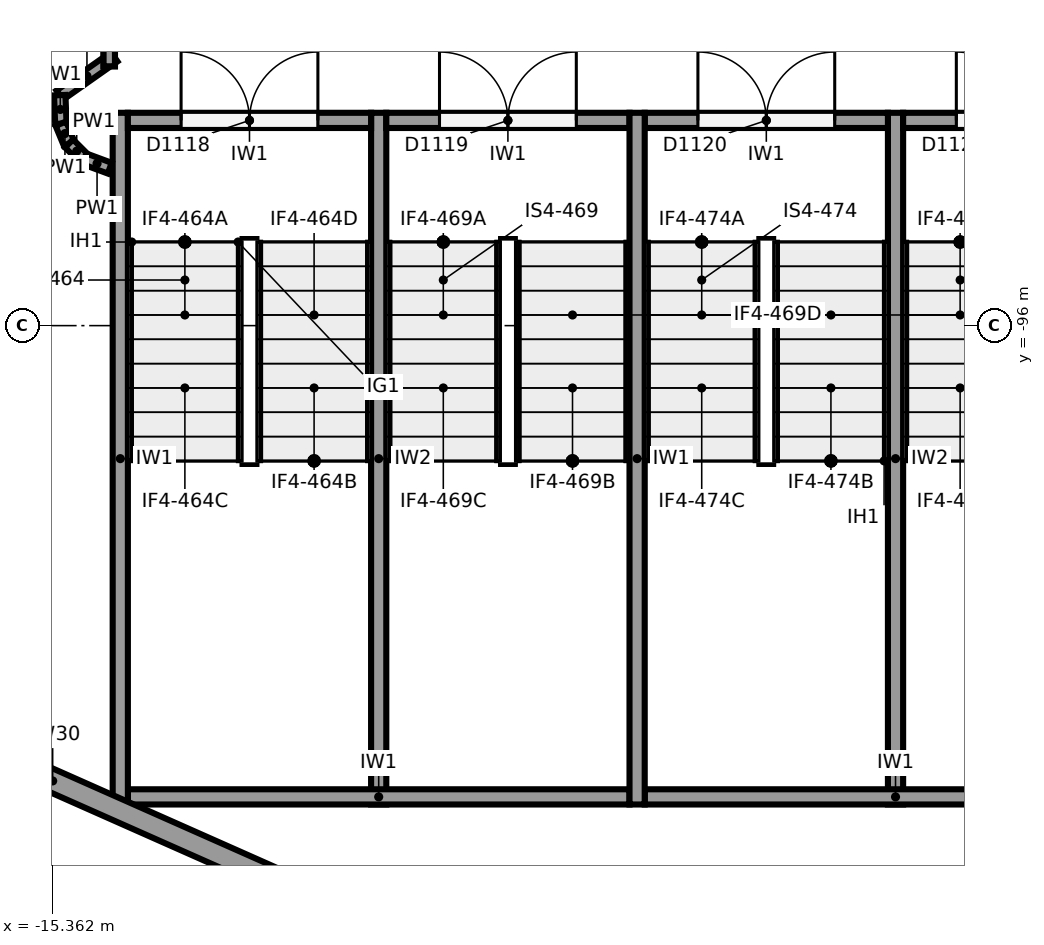
"""IFC4 building model, lengths in metres.
Left out: names, types, materials, properties, quantities, classifications, styles, units other than length and angle.
Written with IfcOpenShell. Run it as: python <this file> out.ifc"""

import sys

from ifc_helpers import new_model, si_unit, direction, frame, frame_2d, origin, place, context, subcontext, project, spatial, rectangle, extrude, element, fill, save


model = new_model("IFC4")
c1 = context("Model", 3, precision=1e-05, world=origin(), true_north=direction((0.0, 1.0)))
c2 = subcontext(c1, "Body", "Model", "MODEL_VIEW")
j1 = project(units=[si_unit("LENGTHUNIT", "METRE"), si_unit("PLANEANGLEUNIT", "RADIAN")], contexts=[c1])
p1 = place(None, origin())
s1 = spatial("IfcSite", under=j1, at=p1, CompositionType="ELEMENT")
p2 = place(p1, origin())
s2 = spatial("IfcBuilding", under=s1, at=p2, CompositionType="ELEMENT")
p3 = place(p2, frame((0.0, 0.0, 12.0)))
s3 = spatial("IfcBuildingStorey", under=s2, at=p3, CompositionType="ELEMENT", Elevation=12.0)
p4 = place(p3, frame((-8.123, -105.198, 0.0), z_axis=(0.0, 0.0, 1.0), x_axis=(-0.914138897099, 0.405401130748, 0.0)))
e1 = element("IfcWall", 1, at=p4, inside=s3, PredefinedType="SOLIDWALL", context=c2, shape_type="SweptSolid", body=[
    extrude(rectangle(XDim=15.824, YDim=0.3, at=frame_2d((7.912, 0.0))), origin(), (0.0, 0.0, 1.0), 4.35),
])
p5 = place(p4, frame((11.574, 0.0, 0.0)))
e2 = element("IfcOpeningElement", 2, at=p5, cuts=e1, PredefinedType="OPENING", context=c2, shape_type="SweptSolid", body=[
    extrude(rectangle(XDim=1.8, YDim=2.4, at=frame_2d((0.9, 1.2))), frame((0.0, 0.16, 0.0), z_axis=(0.0, -1.0, 0.0), x_axis=(1.0, 0.0, 0.0)), (0.0, 0.0, 1.0), 0.32),
])
p6 = place(p3, frame((7.256, -98.782, 0.0), z_axis=(0.0, 0.0, 1.0), x_axis=(-0.914136361455, -0.405406848322, 0.0)))
e3 = element("IfcWall", 3, at=p6, inside=s3, PredefinedType="SOLIDWALL", context=c2, shape_type="SweptSolid", body=[
    extrude(rectangle(XDim=15.824, YDim=0.35, at=frame_2d((7.912, 0.0))), origin(), (0.0, 0.0, 1.0), 4.35),
])
p7 = place(p6, frame((0.75, 0.0, 1.0)))
e4 = element("IfcOpeningElement", 4, at=p7, cuts=e3, PredefinedType="OPENING", context=c2, shape_type="SweptSolid", body=[
    extrude(rectangle(XDim=0.9, YDim=3.25, at=frame_2d((0.45, 1.625))), frame((0.0, 0.185, 0.0), z_axis=(0.0, -1.0, 0.0), x_axis=(1.0, 0.0, 0.0)), (0.0, 0.0, 1.0), 0.37),
])
p8 = place(p6, frame((2.85, 0.0, 1.0)))
e5 = element("IfcOpeningElement", 5, at=p8, cuts=e3, PredefinedType="OPENING", context=c2, shape_type="SweptSolid", body=[
    extrude(rectangle(XDim=0.9, YDim=3.25, at=frame_2d((0.45, 1.625))), frame((0.0, 0.185, 0.0), z_axis=(0.0, -1.0, 0.0), x_axis=(1.0, 0.0, 0.0)), (0.0, 0.0, 1.0), 0.37),
])
p9 = place(p6, frame((4.95, 0.0, 1.0)))
e6 = element("IfcOpeningElement", 6, at=p9, cuts=e3, PredefinedType="OPENING", context=c2, shape_type="SweptSolid", body=[
    extrude(rectangle(XDim=0.9, YDim=3.25, at=frame_2d((0.45, 1.625))), frame((0.0, 0.185, 0.0), z_axis=(0.0, -1.0, 0.0), x_axis=(1.0, 0.0, 0.0)), (0.0, 0.0, 1.0), 0.37),
])
p10 = place(p6, frame((7.05, 0.0, 1.0)))
e7 = element("IfcOpeningElement", 7, at=p10, cuts=e3, PredefinedType="OPENING", context=c2, shape_type="SweptSolid", body=[
    extrude(rectangle(XDim=0.9, YDim=3.25, at=frame_2d((0.45, 1.625))), frame((0.0, 0.185, 0.0), z_axis=(0.0, -1.0, 0.0), x_axis=(1.0, 0.0, 0.0)), (0.0, 0.0, 1.0), 0.37),
])
for number, where, z_axis, x_axis in (
    (8, (-14.467, -102.3, 0.0), (0.0, 0.0, 1.0), (0.0, 1.0, 0.0)),
    (9, (-7.667, -102.3, 0.0), (0.0, 0.0, 1.0), (0.0, 1.0, 0.0)),
):
    element("IfcWall", number, at=place(p3, frame(where, z_axis=z_axis, x_axis=x_axis)), inside=s3, PredefinedType="SHEAR", context=c2, shape_type="SweptSolid", body=[
        extrude(rectangle(XDim=9.1, YDim=0.2, at=frame_2d((4.55, 0.0))), origin(), (0.0, 0.0, 1.0), 5.65),
    ])
p11 = place(p3, frame((-14.367, -102.2, 0.0), z_axis=(0.0, 0.0, 1.0), x_axis=(1.0, 0.0, 0.0)))
e10 = element("IfcWall", 10, at=p11, inside=s3, PredefinedType="SHEAR", context=c2, shape_type="SweptSolid", body=[
    extrude(rectangle(XDim=6.6, YDim=0.2, at=frame_2d((3.3, 0.0))), origin(), (0.0, 0.0, 1.0), 5.65),
])
p12 = place(p3, frame((-7.567, -102.2, 0.0), z_axis=(0.0, 0.0, 1.0), x_axis=(1.0, 0.0, 0.0)))
e11 = element("IfcWall", 11, at=p12, inside=s3, PredefinedType="SHEAR", context=c2, shape_type="SweptSolid", body=[
    extrude(rectangle(XDim=6.6, YDim=0.2, at=frame_2d((3.3, 0.0))), origin(), (0.0, 0.0, 1.0), 5.65),
])
for number, where, z_axis, x_axis in (
    (12, (-11.067, -102.3, 0.0), (0.0, 0.0, 1.0), (0.0, 1.0, 0.0)),
    (13, (-4.267, -102.3, 0.0), (0.0, 0.0, 1.0), (0.0, 1.0, 0.0)),
):
    element("IfcWall", number, at=place(p3, frame(where, z_axis=z_axis, x_axis=x_axis)), inside=s3, PredefinedType="SHEAR", context=c2, shape_type="SweptSolid", body=[
        extrude(rectangle(XDim=9.1, YDim=0.2, at=frame_2d((4.55, 0.0))), origin(), (0.0, 0.0, 1.0), 5.65),
    ])
p13 = place(p3, frame((-14.367, -93.3, 0.0), z_axis=(0.0, 0.0, 1.0), x_axis=(1.0, 0.0, 0.0)))
e14 = element("IfcWall", 14, at=p13, inside=s3, PredefinedType="SHEAR", context=c2, shape_type="SweptSolid", body=[
    extrude(rectangle(XDim=3.2, YDim=0.2, at=frame_2d((1.6, 0.0))), origin(), (0.0, 0.0, 1.0), 5.65),
])
p14 = place(p13, frame((0.7, 0.0, 0.0)))
e15 = element("IfcOpeningElement", 15, at=p14, cuts=e14, PredefinedType="OPENING", context=c2, shape_type="SweptSolid", body=[
    extrude(rectangle(XDim=1.8, YDim=2.1, at=frame_2d((0.9, 1.05))), frame((0.0, 0.11, 0.0), z_axis=(0.0, -1.0, 0.0), x_axis=(1.0, 0.0, 0.0)), (0.0, 0.0, 1.0), 0.22),
])
p15 = place(p3, frame((-10.967, -93.3, 0.0), z_axis=(0.0, 0.0, 1.0), x_axis=(1.0, 0.0, 0.0)))
e16 = element("IfcWall", 16, at=p15, inside=s3, PredefinedType="SHEAR", context=c2, shape_type="SweptSolid", body=[
    extrude(rectangle(XDim=3.2, YDim=0.2, at=frame_2d((1.6, 0.0))), origin(), (0.0, 0.0, 1.0), 5.65),
])
p16 = place(p15, frame((0.7, 0.0, 0.0)))
e17 = element("IfcOpeningElement", 17, at=p16, cuts=e16, PredefinedType="OPENING", context=c2, shape_type="SweptSolid", body=[
    extrude(rectangle(XDim=1.8, YDim=2.1, at=frame_2d((0.9, 1.05))), frame((0.0, 0.11, 0.0), z_axis=(0.0, -1.0, 0.0), x_axis=(1.0, 0.0, 0.0)), (0.0, 0.0, 1.0), 0.22),
])
p17 = place(p3, frame((-7.567, -93.3, 0.0), z_axis=(0.0, 0.0, 1.0), x_axis=(1.0, 0.0, 0.0)))
e18 = element("IfcWall", 18, at=p17, inside=s3, PredefinedType="SHEAR", context=c2, shape_type="SweptSolid", body=[
    extrude(rectangle(XDim=3.2, YDim=0.2, at=frame_2d((1.6, 0.0))), origin(), (0.0, 0.0, 1.0), 5.65),
])
p18 = place(p17, frame((0.7, 0.0, 0.0)))
e19 = element("IfcOpeningElement", 19, at=p18, cuts=e18, PredefinedType="OPENING", context=c2, shape_type="SweptSolid", body=[
    extrude(rectangle(XDim=1.8, YDim=2.1, at=frame_2d((0.9, 1.05))), frame((0.0, 0.11, 0.0), z_axis=(0.0, -1.0, 0.0), x_axis=(1.0, 0.0, 0.0)), (0.0, 0.0, 1.0), 0.22),
])
p19 = place(p3, frame((-4.167, -93.3, 0.0), z_axis=(0.0, 0.0, 1.0), x_axis=(1.0, 0.0, 0.0)))
e20 = element("IfcWall", 20, at=p19, inside=s3, PredefinedType="SHEAR", context=c2, shape_type="SweptSolid", body=[
    extrude(rectangle(XDim=3.2, YDim=0.2, at=frame_2d((1.6, 0.0))), origin(), (0.0, 0.0, 1.0), 5.65),
])
p20 = place(p19, frame((0.7, 0.0, 0.0)))
e21 = element("IfcOpeningElement", 21, at=p20, cuts=e20, PredefinedType="OPENING", context=c2, shape_type="SweptSolid", body=[
    extrude(rectangle(XDim=1.8, YDim=2.1, at=frame_2d((0.9, 1.05))), frame((0.0, 0.11, 0.0), z_axis=(0.0, -1.0, 0.0), x_axis=(1.0, 0.0, 0.0)), (0.0, 0.0, 1.0), 0.22),
])
p21 = place(p3, frame((-14.547, -92.464, 0.0), z_axis=(0.0, 0.0, 1.0), x_axis=(-0.817670329912, -0.57568674779, 0.0)))
e22 = element("IfcWall", 22, at=p21, inside=s3, PredefinedType="PARTITIONING", context=c2, shape_type="SweptSolid", body=[
    extrude(rectangle(XDim=0.876, YDim=0.15, at=frame_2d((0.438, 0.0))), origin(), (0.0, 0.0, 1.0), 5.65),
])
p22 = place(p3, frame((-15.263, -92.968, 0.0), z_axis=(0.0, 0.0, 1.0), x_axis=(0.039007374993, -0.999238922729, 0.0)))
e23 = element("IfcWall", 23, at=p22, inside=s3, PredefinedType="PARTITIONING", context=c2, shape_type="SweptSolid", body=[
    extrude(rectangle(XDim=0.375, YDim=0.15, at=frame_2d((0.188, 0.0))), origin(), (0.0, 0.0, 1.0), 5.65),
])
p23 = place(p3, frame((-15.249, -93.343, 0.0), z_axis=(0.0, 0.0, 1.0), x_axis=(0.382275228123, -0.924048510611, 0.0)))
e24 = element("IfcWall", 24, at=p23, inside=s3, PredefinedType="PARTITIONING", context=c2, shape_type="SweptSolid", body=[
    extrude(rectangle(XDim=0.282, YDim=0.15, at=frame_2d((0.141, 0.0))), origin(), (0.0, 0.0, 1.0), 5.65),
])
p24 = place(p3, frame((-15.141, -93.604, 0.0), z_axis=(0.0, 0.0, 1.0), x_axis=(0.707106781187, -0.707106781187, 0.0)))
e25 = element("IfcWall", 25, at=p24, inside=s3, PredefinedType="PARTITIONING", context=c2, shape_type="SweptSolid", body=[
    extrude(rectangle(XDim=0.285, YDim=0.15, at=frame_2d((0.143, 0.0))), origin(), (0.0, 0.0, 1.0), 5.65),
])
p25 = place(p3, frame((-14.939, -93.805, 0.0), z_axis=(0.0, 0.0, 1.0), x_axis=(0.937897537761, -0.346912393353, 0.0)))
e26 = element("IfcWall", 26, at=p25, inside=s3, PredefinedType="PARTITIONING", context=c2, shape_type="SweptSolid", body=[
    extrude(rectangle(XDim=0.356, YDim=0.15, at=frame_2d((0.178, 0.0))), origin(), (0.0, 0.0, 1.0), 5.65),
])
p26 = place(p3, frame((-14.612, -88.088, 0.0), z_axis=(0.0, 0.0, 1.0), x_axis=(0.0, -1.0, 0.0)))
e27 = element("IfcWall", 27, at=p26, inside=s3, PredefinedType="PARTITIONING", context=c2, shape_type="SweptSolid", body=[
    extrude(rectangle(XDim=4.5, YDim=0.15, at=frame_2d((2.25, 0.0))), origin(), (0.0, 0.0, 1.0), 4.35),
])
p27 = place(p26, frame((0.95, 0.0, 0.0)))
e28 = element("IfcOpeningElement", 28, at=p27, cuts=e27, PredefinedType="OPENING", context=c2, shape_type="SweptSolid", body=[
    extrude(rectangle(XDim=1.8, YDim=2.1, at=frame_2d((0.9, 1.05))), frame((0.0, 0.085, 0.0), z_axis=(0.0, -1.0, 0.0), x_axis=(1.0, 0.0, 0.0)), (0.0, 0.0, 1.0), 0.17),
])
p28 = place(p3, frame((-14.612, -90.888, 4.35), z_axis=(0.0, 0.0, 1.0), x_axis=(0.0, -1.0, 0.0)))
e29 = element("IfcWall", 29, at=p28, inside=s3, PredefinedType="PARTITIONING", context=c2, shape_type="SweptSolid", body=[
    extrude(rectangle(XDim=1.7, YDim=0.15, at=frame_2d((0.85, 0.0))), origin(), (0.0, 0.0, 1.0), 1.3),
])
p29 = place(p14, origin())
e30 = element("IfcDoor", 30, at=p29, inside=s3, OperationType="DOUBLE_DOOR_SINGLE_SWING", PredefinedType="DOOR", context=c2, shape_type="SweptSolid", body=[
    extrude(rectangle(XDim=1.8, YDim=2.1, at=frame_2d((0.9, 1.05))), frame((0.0, 0.025, 0.0), z_axis=(0.0, -1.0, 0.0), x_axis=(1.0, 0.0, 0.0)), (0.0, 0.0, 1.0), 0.05),
])
fill(e15, e30)
p30 = place(p16, origin())
e31 = element("IfcDoor", 31, at=p30, inside=s3, OperationType="DOUBLE_DOOR_SINGLE_SWING", PredefinedType="DOOR", context=c2, shape_type="SweptSolid", body=[
    extrude(rectangle(XDim=1.8, YDim=2.1, at=frame_2d((0.9, 1.05))), frame((0.0, 0.025, 0.0), z_axis=(0.0, -1.0, 0.0), x_axis=(1.0, 0.0, 0.0)), (0.0, 0.0, 1.0), 0.05),
])
fill(e17, e31)
p31 = place(p18, origin())
e32 = element("IfcDoor", 32, at=p31, inside=s3, OperationType="DOUBLE_DOOR_SINGLE_SWING", PredefinedType="DOOR", context=c2, shape_type="SweptSolid", body=[
    extrude(rectangle(XDim=1.8, YDim=2.1, at=frame_2d((0.9, 1.05))), frame((0.0, 0.025, 0.0), z_axis=(0.0, -1.0, 0.0), x_axis=(1.0, 0.0, 0.0)), (0.0, 0.0, 1.0), 0.05),
])
fill(e19, e32)
p32 = place(p20, origin())
e33 = element("IfcDoor", 33, at=p32, inside=s3, OperationType="DOUBLE_DOOR_SINGLE_SWING", PredefinedType="DOOR", context=c2, shape_type="SweptSolid", body=[
    extrude(rectangle(XDim=1.8, YDim=2.1, at=frame_2d((0.9, 1.05))), frame((0.0, 0.025, 0.0), z_axis=(0.0, -1.0, 0.0), x_axis=(1.0, 0.0, 0.0)), (0.0, 0.0, 1.0), 0.05),
])
fill(e21, e33)
save(model, sys.argv[1])
